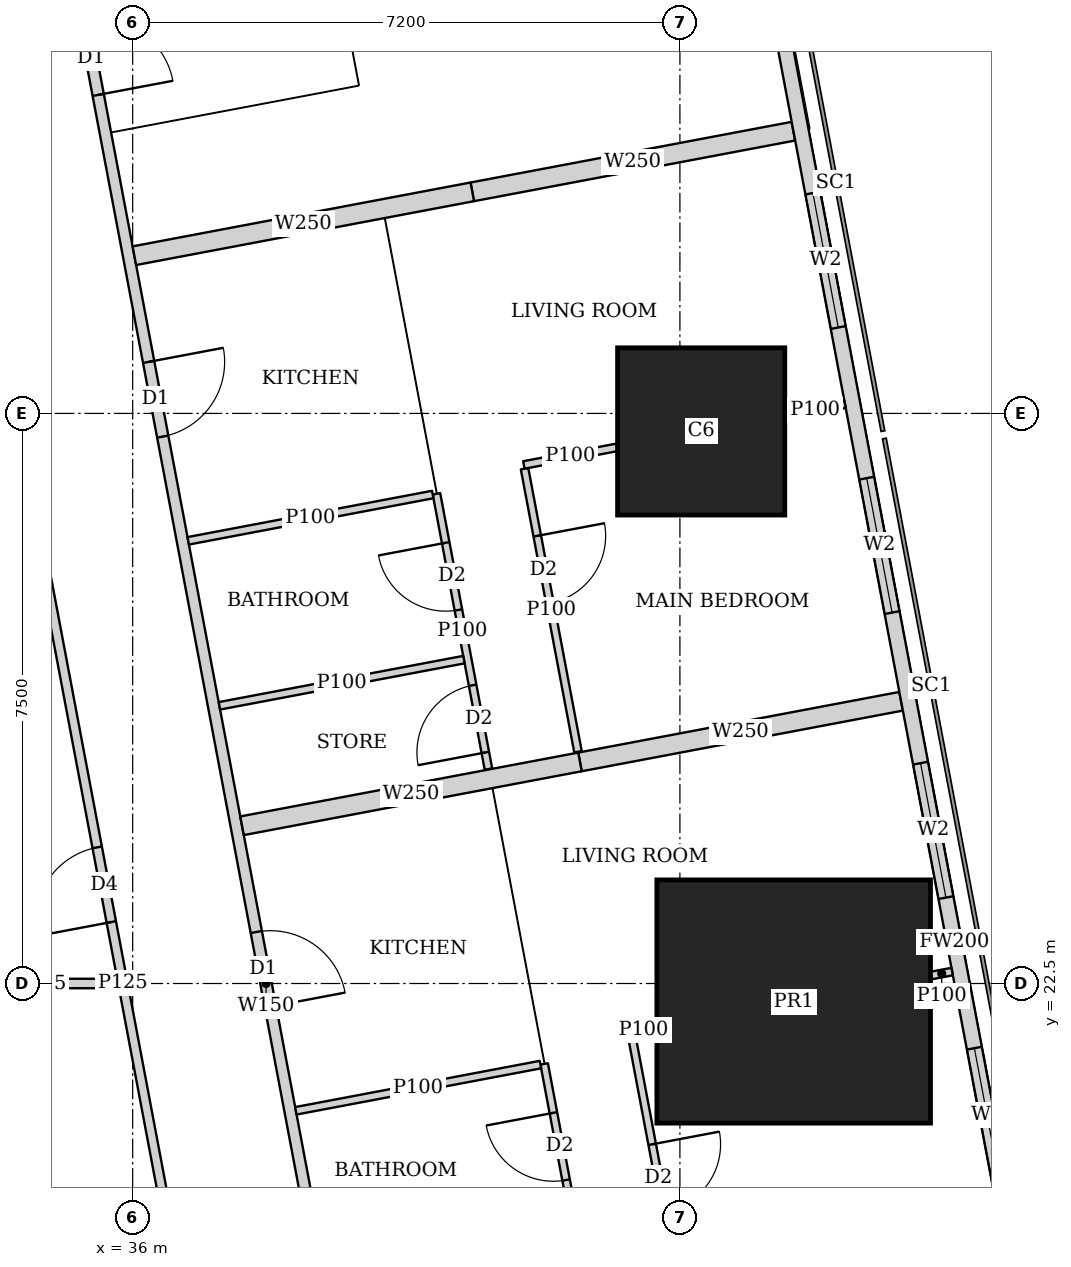
"""IFC4 building model, lengths in metres.
Left out: names, types, materials, properties, quantities, classifications, styles, units other than length and angle.
Written with IfcOpenShell. Run it as: python <this file> out.ifc"""

import sys

from ifc_helpers import new_model, si_unit, direction, frame, frame_2d, origin, origin_2d, place, context, subcontext, project, spatial, rectangle, extrude, element, fill, save


model = new_model("IFC4")
c1 = context("Model", 3, precision=1e-05, world=origin(), true_north=direction((0.0, 1.0)))
c2 = subcontext(c1, "Body", "Model", "MODEL_VIEW")
j1 = project(units=[si_unit("LENGTHUNIT", "METRE"), si_unit("PLANEANGLEUNIT", "RADIAN")], contexts=[c1])
p1 = place(None, origin())
s1 = spatial("IfcSite", under=j1, at=p1, CompositionType="ELEMENT")
p2 = place(p1, origin())
s2 = spatial("IfcBuilding", under=s1, at=p2, CompositionType="ELEMENT")
p3 = place(p2, frame((0.0, 0.0, 122.9)))
s3 = spatial("IfcBuildingStorey", under=s2, at=p3, CompositionType="ELEMENT", Elevation=122.9)
p4 = place(p3, frame((44.697, 22.263, 0.0), z_axis=(0.0, 0.0, 1.0), x_axis=(1.0, 0.0, 0.0)))
e1 = element("IfcColumn", 1, at=p4, inside=s3, PredefinedType="COLUMN", context=c2, shape_type="SweptSolid", body=[
    extrude(rectangle(XDim=3.6, YDim=3.2, at=origin_2d()), origin(), (0.0, 0.0, 1.0), 3.75),
])
p5 = place(p3, frame((43.48, 29.763, 0.0), z_axis=(0.0, 0.0, 1.0), x_axis=(1.0, 0.0, 0.0)))
e2 = element("IfcColumn", 2, at=p5, inside=s3, PredefinedType="COLUMN", context=c2, shape_type="SweptSolid", body=[
    extrude(rectangle(XDim=2.2, YDim=2.2, at=origin_2d()), origin(), (0.0, 0.0, 1.0), 3.75),
])
p6 = place(p3, frame((50.653, 2.703, 0.0), z_axis=(0.0, 0.0, 1.0), x_axis=(-0.185612026696, 0.982623109613, 0.0)))
e3 = element("IfcWall", 3, at=p6, inside=s3, PredefinedType="SOLIDWALL", context=c2, shape_type="SweptSolid", body=[
    extrude(rectangle(XDim=41.393, YDim=0.2, at=frame_2d((20.697, 0.0))), origin(), (0.0, 0.0, 1.0), 3.5),
])
p7 = place(p6, frame((1.633, 0.0, 0.9)))
e4 = element("IfcOpeningElement", 4, at=p7, cuts=e3, PredefinedType="OPENING", context=c2, shape_type="SweptSolid", body=[
    extrude(rectangle(XDim=1.8, YDim=1.5, at=frame_2d((0.9, 0.75))), frame((0.0, 0.11, 0.0), z_axis=(0.0, -1.0, 0.0), x_axis=(1.0, 0.0, 0.0)), (0.0, 0.0, 1.0), 0.22),
])
p8 = place(p6, frame((6.032, 0.0, 0.9)))
e5 = element("IfcOpeningElement", 5, at=p8, cuts=e3, PredefinedType="OPENING", context=c2, shape_type="SweptSolid", body=[
    extrude(rectangle(XDim=1.8, YDim=1.5, at=frame_2d((0.9, 0.75))), frame((0.0, 0.11, 0.0), z_axis=(0.0, -1.0, 0.0), x_axis=(1.0, 0.0, 0.0)), (0.0, 0.0, 1.0), 0.22),
])
p9 = place(p6, frame((9.848, 0.0, 0.9)))
e6 = element("IfcOpeningElement", 6, at=p9, cuts=e3, PredefinedType="OPENING", context=c2, shape_type="SweptSolid", body=[
    extrude(rectangle(XDim=1.8, YDim=1.5, at=frame_2d((0.9, 0.75))), frame((0.0, 0.11, 0.0), z_axis=(0.0, -1.0, 0.0), x_axis=(1.0, 0.0, 0.0)), (0.0, 0.0, 1.0), 0.22),
])
p10 = place(p6, frame((13.664, 0.0, 0.9)))
e7 = element("IfcOpeningElement", 7, at=p10, cuts=e3, PredefinedType="OPENING", context=c2, shape_type="SweptSolid", body=[
    extrude(rectangle(XDim=1.8, YDim=1.5, at=frame_2d((0.9, 0.75))), frame((0.0, 0.11, 0.0), z_axis=(0.0, -1.0, 0.0), x_axis=(1.0, 0.0, 0.0)), (0.0, 0.0, 1.0), 0.22),
])
p11 = place(p6, frame((17.481, 0.0, 0.9)))
e8 = element("IfcOpeningElement", 8, at=p11, cuts=e3, PredefinedType="OPENING", context=c2, shape_type="SweptSolid", body=[
    extrude(rectangle(XDim=1.8, YDim=1.5, at=frame_2d((0.9, 0.75))), frame((0.0, 0.11, 0.0), z_axis=(0.0, -1.0, 0.0), x_axis=(1.0, 0.0, 0.0)), (0.0, 0.0, 1.0), 0.22),
])
p12 = place(p6, frame((21.297, 0.0, 0.9)))
e9 = element("IfcOpeningElement", 9, at=p12, cuts=e3, PredefinedType="OPENING", context=c2, shape_type="SweptSolid", body=[
    extrude(rectangle(XDim=1.8, YDim=1.5, at=frame_2d((0.9, 0.75))), frame((0.0, 0.11, 0.0), z_axis=(0.0, -1.0, 0.0), x_axis=(1.0, 0.0, 0.0)), (0.0, 0.0, 1.0), 0.22),
])
p13 = place(p6, frame((25.113, 0.0, 0.9)))
e10 = element("IfcOpeningElement", 10, at=p13, cuts=e3, PredefinedType="OPENING", context=c2, shape_type="SweptSolid", body=[
    extrude(rectangle(XDim=1.8, YDim=1.5, at=frame_2d((0.9, 0.75))), frame((0.0, 0.11, 0.0), z_axis=(0.0, -1.0, 0.0), x_axis=(1.0, 0.0, 0.0)), (0.0, 0.0, 1.0), 0.22),
])
p14 = place(p6, frame((28.93, 0.0, 0.9)))
e11 = element("IfcOpeningElement", 11, at=p14, cuts=e3, PredefinedType="OPENING", context=c2, shape_type="SweptSolid", body=[
    extrude(rectangle(XDim=1.8, YDim=1.5, at=frame_2d((0.9, 0.75))), frame((0.0, 0.11, 0.0), z_axis=(0.0, -1.0, 0.0), x_axis=(1.0, 0.0, 0.0)), (0.0, 0.0, 1.0), 0.22),
])
p15 = place(p6, frame((32.746, 0.0, 0.9)))
e12 = element("IfcOpeningElement", 12, at=p15, cuts=e3, PredefinedType="OPENING", context=c2, shape_type="SweptSolid", body=[
    extrude(rectangle(XDim=1.8, YDim=1.5, at=frame_2d((0.9, 0.75))), frame((0.0, 0.11, 0.0), z_axis=(0.0, -1.0, 0.0), x_axis=(1.0, 0.0, 0.0)), (0.0, 0.0, 1.0), 0.22),
])
p16 = place(p6, frame((36.481, 0.0, 0.9)))
e13 = element("IfcOpeningElement", 13, at=p16, cuts=e3, PredefinedType="OPENING", context=c2, shape_type="SweptSolid", body=[
    extrude(rectangle(XDim=1.8, YDim=1.5, at=frame_2d((0.9, 0.75))), frame((0.0, 0.11, 0.0), z_axis=(0.0, -1.0, 0.0), x_axis=(1.0, 0.0, 0.0)), (0.0, 0.0, 1.0), 0.22),
])
p17 = place(p3, frame((33.382, 45.65, 0.0), z_axis=(0.0, 0.0, 1.0), x_axis=(0.185593544777, -0.982626600565, 0.0)))
e14 = element("IfcWall", 14, at=p17, inside=s3, PredefinedType="SOLIDWALL", context=c2, shape_type="SweptSolid", body=[
    extrude(rectangle(XDim=47.118, YDim=0.15, at=frame_2d((23.559, 0.0))), origin(), (0.0, 0.0, 1.0), 2.2),
])
p18 = place(p17, frame((10.662, 0.0, 0.0)))
e15 = element("IfcOpeningElement", 15, at=p18, cuts=e14, PredefinedType="OPENING", context=c2, shape_type="SweptSolid", body=[
    extrude(rectangle(XDim=1.0, YDim=2.1, at=frame_2d((0.5, 1.05))), frame((0.0, 0.085, 0.0), z_axis=(0.0, -1.0, 0.0), x_axis=(1.0, 0.0, 0.0)), (0.0, 0.0, 1.0), 0.17),
])
p19 = place(p17, frame((15.237, 0.0, 0.0)))
e16 = element("IfcOpeningElement", 16, at=p19, cuts=e14, PredefinedType="OPENING", context=c2, shape_type="SweptSolid", body=[
    extrude(rectangle(XDim=1.0, YDim=2.1, at=frame_2d((0.5, 1.05))), frame((0.0, 0.085, 0.0), z_axis=(0.0, -1.0, 0.0), x_axis=(1.0, 0.0, 0.0)), (0.0, 0.0, 1.0), 0.17),
])
p20 = place(p17, frame((22.87, 0.0, 0.0)))
e17 = element("IfcOpeningElement", 17, at=p20, cuts=e14, PredefinedType="OPENING", context=c2, shape_type="SweptSolid", body=[
    extrude(rectangle(XDim=1.0, YDim=2.1, at=frame_2d((0.5, 1.05))), frame((0.0, 0.085, 0.0), z_axis=(0.0, -1.0, 0.0), x_axis=(1.0, 0.0, 0.0)), (0.0, 0.0, 1.0), 0.17),
])
p21 = place(p17, frame((33.833, 0.0, 0.0)))
e18 = element("IfcOpeningElement", 18, at=p21, cuts=e14, PredefinedType="OPENING", context=c2, shape_type="SweptSolid", body=[
    extrude(rectangle(XDim=1.0, YDim=2.1, at=frame_2d((0.5, 1.05))), frame((0.0, 0.085, 0.0), z_axis=(0.0, -1.0, 0.0), x_axis=(1.0, 0.0, 0.0)), (0.0, 0.0, 1.0), 0.17),
])
p22 = place(p3, frame((41.156, 29.273, 0.0), z_axis=(0.0, 0.0, 1.0), x_axis=(0.185474762472, -0.982649028131, 0.0)))
e19 = element("IfcWall", 19, at=p22, inside=s3, PredefinedType="PARTITIONING", context=c2, shape_type="SweptSolid", body=[
    extrude(rectangle(XDim=3.79, YDim=0.1, at=frame_2d((1.895, 0.0))), origin(), (0.0, 0.0, 1.0), 2.5),
])
p23 = place(p22, frame((0.9, 0.0, 0.0)))
e20 = element("IfcOpeningElement", 20, at=p23, cuts=e19, PredefinedType="OPENING", context=c2, shape_type="SweptSolid", body=[
    extrude(rectangle(XDim=0.9, YDim=2.1, at=frame_2d((0.45, 1.05))), frame((0.0, 0.06, 0.0), z_axis=(0.0, -1.0, 0.0), x_axis=(1.0, 0.0, 0.0)), (0.0, 0.0, 1.0), 0.12),
])
p24 = place(p3, frame((39.997, 28.942, 0.0), z_axis=(0.0, 0.0, 1.0), x_axis=(0.185580474845, -0.982629069057, 0.0)))
e21 = element("IfcWall", 21, at=p24, inside=s3, PredefinedType="PARTITIONING", context=c2, shape_type="SweptSolid", body=[
    extrude(rectangle(XDim=3.685, YDim=0.1, at=frame_2d((1.842, 0.0))), origin(), (0.0, 0.0, 1.0), 3.5),
])
p25 = place(p24, frame((0.655, 0.0, 0.0)))
e22 = element("IfcOpeningElement", 22, at=p25, cuts=e21, PredefinedType="OPENING", context=c2, shape_type="SweptSolid", body=[
    extrude(rectangle(XDim=0.9, YDim=2.1, at=frame_2d((0.45, 1.05))), frame((0.0, 0.06, 0.0), z_axis=(0.0, -1.0, 0.0), x_axis=(1.0, 0.0, 0.0)), (0.0, 0.0, 1.0), 0.12),
])
p26 = place(p24, frame((2.563, 0.0, 0.0)))
e23 = element("IfcOpeningElement", 23, at=p26, cuts=e21, PredefinedType="OPENING", context=c2, shape_type="SweptSolid", body=[
    extrude(rectangle(XDim=0.9, YDim=2.1, at=frame_2d((0.45, 1.05))), frame((0.0, 0.06, 0.0), z_axis=(0.0, -1.0, 0.0), x_axis=(1.0, 0.0, 0.0)), (0.0, 0.0, 1.0), 0.12),
])
p27 = place(p3, frame((45.372, 30.121, 0.0), z_axis=(0.0, 0.0, 1.0), x_axis=(-0.982512656401, -0.186195810938, 0.0)))
e24 = element("IfcWall", 24, at=p27, inside=s3, PredefinedType="PARTITIONING", context=c2, shape_type="SweptSolid", body=[
    extrude(rectangle(XDim=0.796, YDim=0.1, at=frame_2d((0.398, 0.0))), origin(), (0.0, 0.0, 1.0), 3.5),
])
p28 = place(p3, frame((42.37, 29.553, 0.0), z_axis=(0.0, 0.0, 1.0), x_axis=(-0.98263602344, -0.185543648338, 0.0)))
e25 = element("IfcWall", 25, at=p28, inside=s3, PredefinedType="PARTITIONING", context=c2, shape_type="SweptSolid", body=[
    extrude(rectangle(XDim=1.245, YDim=0.1, at=frame_2d((0.623, 0.0))), origin(), (0.0, 0.0, 1.0), 2.5),
])
p29 = place(p3, frame((39.948, 28.933, 0.0), z_axis=(0.0, 0.0, 1.0), x_axis=(-0.982542259571, -0.186039533857, 0.0)))
e26 = element("IfcWall", 26, at=p29, inside=s3, PredefinedType="PARTITIONING", context=c2, shape_type="SweptSolid", body=[
    extrude(rectangle(XDim=3.274, YDim=0.1, at=frame_2d((1.637, 0.0))), origin(), (0.0, 0.0, 1.0), 3.5),
])
p30 = place(p3, frame((40.358, 26.761, 0.0), z_axis=(0.0, 0.0, 1.0), x_axis=(-0.982607776398, -0.185693181787, 0.0)))
e27 = element("IfcWall", 27, at=p30, inside=s3, PredefinedType="PARTITIONING", context=c2, shape_type="SweptSolid", body=[
    extrude(rectangle(XDim=3.274, YDim=0.1, at=frame_2d((1.637, 0.0))), origin(), (0.0, 0.0, 1.0), 3.5),
])
p31 = place(p3, frame((44.693, 33.713, 0.0), z_axis=(0.0, 0.0, 1.0), x_axis=(-0.982633535512, -0.185556823879, 0.0)))
e28 = element("IfcWall", 28, at=p31, inside=s3, PredefinedType="SOLIDWALL", context=c2, shape_type="SweptSolid", body=[
    extrude(rectangle(XDim=4.3, YDim=0.25, at=frame_2d((2.15, 0.0))), origin(), (0.0, 0.0, 1.0), 2.2),
])
p32 = place(p3, frame((40.468, 32.915, 0.0), z_axis=(0.0, 0.0, 1.0), x_axis=(-0.982612837616, -0.185666398014, 0.0)))
e29 = element("IfcWall", 29, at=p32, inside=s3, PredefinedType="SOLIDWALL", context=c2, shape_type="SweptSolid", body=[
    extrude(rectangle(XDim=4.525, YDim=0.25, at=frame_2d((2.262, 0.0))), origin(), (0.0, 0.0, 1.0), 3.5),
])
p33 = place(p3, frame((42.566, 21.809, 0.0), z_axis=(0.0, 0.0, 1.0), x_axis=(0.18559218796, -0.982626856832, 0.0)))
e30 = element("IfcWall", 30, at=p33, inside=s3, PredefinedType="PARTITIONING", context=c2, shape_type="SweptSolid", body=[
    extrude(rectangle(XDim=6.105, YDim=0.1, at=frame_2d((3.052, 0.0))), origin(), (0.0, 0.0, 1.0), 2.5),
])
p34 = place(p33, frame((1.45, 0.0, 0.0)))
e31 = element("IfcOpeningElement", 31, at=p34, cuts=e30, PredefinedType="OPENING", context=c2, shape_type="SweptSolid", body=[
    extrude(rectangle(XDim=0.9, YDim=2.1, at=frame_2d((0.45, 1.05))), frame((0.0, 0.06, 0.0), z_axis=(0.0, -1.0, 0.0), x_axis=(1.0, 0.0, 0.0)), (0.0, 0.0, 1.0), 0.12),
])
p35 = place(p33, frame((4.163, 0.0, 0.0)))
e32 = element("IfcOpeningElement", 32, at=p35, cuts=e30, PredefinedType="OPENING", context=c2, shape_type="SweptSolid", body=[
    extrude(rectangle(XDim=0.9, YDim=2.1, at=frame_2d((0.45, 1.05))), frame((0.0, 0.06, 0.0), z_axis=(0.0, -1.0, 0.0), x_axis=(1.0, 0.0, 0.0)), (0.0, 0.0, 1.0), 0.12),
])
p36 = place(p3, frame((41.414, 21.442, 0.0), z_axis=(0.0, 0.0, 1.0), x_axis=(0.185636022079, -0.982618576716, 0.0)))
e33 = element("IfcWall", 33, at=p36, inside=s3, PredefinedType="PARTITIONING", context=c2, shape_type="SweptSolid", body=[
    extrude(rectangle(XDim=5.731, YDim=0.1, at=frame_2d((2.866, 0.0))), origin(), (0.0, 0.0, 1.0), 3.5),
])
p37 = place(p36, frame((0.655, 0.0, 0.0)))
e34 = element("IfcOpeningElement", 34, at=p37, cuts=e33, PredefinedType="OPENING", context=c2, shape_type="SweptSolid", body=[
    extrude(rectangle(XDim=0.9, YDim=2.1, at=frame_2d((0.45, 1.05))), frame((0.0, 0.06, 0.0), z_axis=(0.0, -1.0, 0.0), x_axis=(1.0, 0.0, 0.0)), (0.0, 0.0, 1.0), 0.12),
])
p38 = place(p36, frame((2.563, 0.0, 0.0)))
e35 = element("IfcOpeningElement", 35, at=p38, cuts=e33, PredefinedType="OPENING", context=c2, shape_type="SweptSolid", body=[
    extrude(rectangle(XDim=0.9, YDim=2.1, at=frame_2d((0.45, 1.05))), frame((0.0, 0.06, 0.0), z_axis=(0.0, -1.0, 0.0), x_axis=(1.0, 0.0, 0.0)), (0.0, 0.0, 1.0), 0.12),
])
p39 = place(p3, frame((46.782, 22.657, 0.0), z_axis=(0.0, 0.0, 1.0), x_axis=(-0.982574553168, -0.185868898601, 0.0)))
e36 = element("IfcWall", 36, at=p39, inside=s3, PredefinedType="PARTITIONING", context=c2, shape_type="SweptSolid", body=[
    extrude(rectangle(XDim=0.28, YDim=0.1, at=frame_2d((0.14, 0.0))), origin(), (0.0, 0.0, 1.0), 3.5),
])
p40 = place(p3, frame((42.887, 21.921, 0.0), z_axis=(0.0, 0.0, 1.0), x_axis=(-0.982274918032, -0.187445953293, 0.0)))
e37 = element("IfcWall", 37, at=p40, inside=s3, PredefinedType="PARTITIONING", context=c2, shape_type="SweptSolid", body=[
    extrude(rectangle(XDim=0.336, YDim=0.1, at=frame_2d((0.168, 0.0))), origin(), (0.0, 0.0, 1.0), 2.5),
])
p41 = place(p3, frame((41.365, 21.433, 0.0), z_axis=(0.0, 0.0, 1.0), x_axis=(-0.982607026909, -0.185697147715, 0.0)))
e38 = element("IfcWall", 38, at=p41, inside=s3, PredefinedType="PARTITIONING", context=c2, shape_type="SweptSolid", body=[
    extrude(rectangle(XDim=3.275, YDim=0.1, at=frame_2d((1.637, 0.0))), origin(), (0.0, 0.0, 1.0), 3.5),
])
p42 = place(p3, frame((46.11, 26.213, 0.0), z_axis=(0.0, 0.0, 1.0), x_axis=(-0.982633535512, -0.185556823879, 0.0)))
e39 = element("IfcWall", 39, at=p42, inside=s3, PredefinedType="SOLIDWALL", context=c2, shape_type="SweptSolid", body=[
    extrude(rectangle(XDim=4.3, YDim=0.25, at=frame_2d((2.15, 0.0))), origin(), (0.0, 0.0, 1.0), 2.2),
])
p43 = place(p3, frame((41.885, 25.415, 0.0), z_axis=(0.0, 0.0, 1.0), x_axis=(-0.982612837616, -0.185666398014, 0.0)))
e40 = element("IfcWall", 40, at=p43, inside=s3, PredefinedType="SOLIDWALL", context=c2, shape_type="SweptSolid", body=[
    extrude(rectangle(XDim=4.525, YDim=0.25, at=frame_2d((2.262, 0.0))), origin(), (0.0, 0.0, 1.0), 3.5),
])
p44 = place(p3, frame((38.202, 10.163, 0.0), z_axis=(0.0, 0.0, 1.0), x_axis=(-0.185610321132, 0.982623431783, 0.0)))
e41 = element("IfcWall", 41, at=p44, inside=s3, PredefinedType="PARTITIONING", context=c2, shape_type="SweptSolid", body=[
    extrude(rectangle(XDim=25.111, YDim=0.125, at=frame_2d((12.556, 0.0))), origin(), (0.0, 0.0, 1.0), 2.5),
])
p45 = place(p44, frame((0.708, 0.0, 0.0)))
e42 = element("IfcOpeningElement", 42, at=p45, cuts=e41, PredefinedType="OPENING", context=c2, shape_type="SweptSolid", body=[
    extrude(rectangle(XDim=1.0, YDim=2.1, at=frame_2d((0.5, 1.05))), frame((0.0, 0.073, 0.0), z_axis=(0.0, -1.0, 0.0), x_axis=(1.0, 0.0, 0.0)), (0.0, 0.0, 1.0), 0.145),
])
p46 = place(p44, frame((13.378, 0.0, 0.0)))
e43 = element("IfcOpeningElement", 43, at=p46, cuts=e41, PredefinedType="OPENING", context=c2, shape_type="SweptSolid", body=[
    extrude(rectangle(XDim=1.0, YDim=2.1, at=frame_2d((0.5, 1.05))), frame((0.0, 0.073, 0.0), z_axis=(0.0, -1.0, 0.0), x_axis=(1.0, 0.0, 0.0)), (0.0, 0.0, 1.0), 0.145),
])
p47 = place(p44, frame((21.25, 0.0, 0.0)))
e44 = element("IfcOpeningElement", 44, at=p47, cuts=e41, PredefinedType="OPENING", context=c2, shape_type="SweptSolid", body=[
    extrude(rectangle(XDim=1.0, YDim=2.1, at=frame_2d((0.5, 1.05))), frame((0.0, 0.073, 0.0), z_axis=(0.0, -1.0, 0.0), x_axis=(1.0, 0.0, 0.0)), (0.0, 0.0, 1.0), 0.145),
])
p48 = place(p44, frame((23.453, 0.0, 0.0)))
e45 = element("IfcOpeningElement", 45, at=p48, cuts=e41, PredefinedType="OPENING", context=c2, shape_type="SweptSolid", body=[
    extrude(rectangle(XDim=1.0, YDim=2.1, at=frame_2d((0.5, 1.05))), frame((0.0, 0.073, 0.0), z_axis=(0.0, -1.0, 0.0), x_axis=(1.0, 0.0, 0.0)), (0.0, 0.0, 1.0), 0.145),
])
p49 = place(p3, frame((33.801, 22.5, 0.0), z_axis=(0.0, 0.0, 1.0), x_axis=(1.0, 0.0, 0.0)))
e46 = element("IfcWall", 46, at=p49, inside=s3, PredefinedType="PARTITIONING", context=c2, shape_type="SweptSolid", body=[
    extrude(rectangle(XDim=1.995, YDim=0.125, at=frame_2d((0.998, 0.0))), origin(), (0.0, 0.0, 1.0), 2.5),
])
p50 = place(p11, origin())
e47 = element("IfcWindow", 47, at=p50, inside=s3, PartitioningType="SINGLE_PANEL", PredefinedType="WINDOW", context=c2, shape_type="SweptSolid", body=[
    extrude(rectangle(XDim=1.8, YDim=1.5, at=frame_2d((0.9, 0.75))), frame((0.0, 0.03, 0.0), z_axis=(0.0, -1.0, 0.0), x_axis=(1.0, 0.0, 0.0)), (0.0, 0.0, 1.0), 0.06),
])
fill(e8, e47)
p51 = place(p12, origin())
e48 = element("IfcWindow", 48, at=p51, inside=s3, PartitioningType="SINGLE_PANEL", PredefinedType="WINDOW", context=c2, shape_type="SweptSolid", body=[
    extrude(rectangle(XDim=1.8, YDim=1.5, at=frame_2d((0.9, 0.75))), frame((0.0, 0.03, 0.0), z_axis=(0.0, -1.0, 0.0), x_axis=(1.0, 0.0, 0.0)), (0.0, 0.0, 1.0), 0.06),
])
fill(e9, e48)
p52 = place(p13, origin())
e49 = element("IfcWindow", 49, at=p52, inside=s3, PartitioningType="SINGLE_PANEL", PredefinedType="WINDOW", context=c2, shape_type="SweptSolid", body=[
    extrude(rectangle(XDim=1.8, YDim=1.5, at=frame_2d((0.9, 0.75))), frame((0.0, 0.03, 0.0), z_axis=(0.0, -1.0, 0.0), x_axis=(1.0, 0.0, 0.0)), (0.0, 0.0, 1.0), 0.06),
])
fill(e10, e49)
p53 = place(p14, origin())
e50 = element("IfcWindow", 50, at=p53, inside=s3, PartitioningType="SINGLE_PANEL", PredefinedType="WINDOW", context=c2, shape_type="SweptSolid", body=[
    extrude(rectangle(XDim=1.8, YDim=1.5, at=frame_2d((0.9, 0.75))), frame((0.0, 0.03, 0.0), z_axis=(0.0, -1.0, 0.0), x_axis=(1.0, 0.0, 0.0)), (0.0, 0.0, 1.0), 0.06),
])
fill(e11, e50)
p54 = place(p18, origin())
e51 = element("IfcDoor", 51, at=p54, inside=s3, OperationType="SINGLE_SWING_RIGHT", PredefinedType="DOOR", context=c2, shape_type="SweptSolid", body=[
    extrude(rectangle(XDim=1.0, YDim=2.1, at=frame_2d((0.5, 1.05))), frame((0.0, 0.025, 0.0), z_axis=(0.0, -1.0, 0.0), x_axis=(1.0, 0.0, 0.0)), (0.0, 0.0, 1.0), 0.05),
])
fill(e15, e51)
p55 = place(p23, origin())
e52 = element("IfcDoor", 52, at=p55, inside=s3, OperationType="SINGLE_SWING_LEFT", PredefinedType="DOOR", context=c2, shape_type="SweptSolid", body=[
    extrude(rectangle(XDim=0.9, YDim=2.1, at=frame_2d((0.45, 1.05))), frame((0.0, 0.025, 0.0), z_axis=(0.0, -1.0, 0.0), x_axis=(1.0, 0.0, 0.0)), (0.0, 0.0, 1.0), 0.05),
])
fill(e20, e52)
p56 = place(p25, origin())
e53 = element("IfcDoor", 53, at=p56, inside=s3, OperationType="SINGLE_SWING_RIGHT", PredefinedType="DOOR", context=c2, shape_type="SweptSolid", body=[
    extrude(rectangle(XDim=0.9, YDim=2.1, at=frame_2d((0.45, 1.05))), frame((0.0, 0.025, 0.0), z_axis=(0.0, -1.0, 0.0), x_axis=(1.0, 0.0, 0.0)), (0.0, 0.0, 1.0), 0.05),
])
fill(e22, e53)
p57 = place(p26, origin())
e54 = element("IfcDoor", 54, at=p57, inside=s3, OperationType="SINGLE_SWING_LEFT", PredefinedType="DOOR", context=c2, shape_type="SweptSolid", body=[
    extrude(rectangle(XDim=0.9, YDim=2.1, at=frame_2d((0.45, 1.05))), frame((0.0, 0.025, 0.0), z_axis=(0.0, -1.0, 0.0), x_axis=(1.0, 0.0, 0.0)), (0.0, 0.0, 1.0), 0.05),
])
fill(e23, e54)
p58 = place(p19, origin())
e55 = element("IfcDoor", 55, at=p58, inside=s3, OperationType="SINGLE_SWING_LEFT", PredefinedType="DOOR", context=c2, shape_type="SweptSolid", body=[
    extrude(rectangle(XDim=1.0, YDim=2.1, at=frame_2d((0.5, 1.05))), frame((0.0, 0.025, 0.0), z_axis=(0.0, -1.0, 0.0), x_axis=(1.0, 0.0, 0.0)), (0.0, 0.0, 1.0), 0.05),
])
fill(e16, e55)
p59 = place(p34, origin())
e56 = element("IfcDoor", 56, at=p59, inside=s3, OperationType="SINGLE_SWING_LEFT", PredefinedType="DOOR", context=c2, shape_type="SweptSolid", body=[
    extrude(rectangle(XDim=0.9, YDim=2.1, at=frame_2d((0.45, 1.05))), frame((0.0, 0.025, 0.0), z_axis=(0.0, -1.0, 0.0), x_axis=(1.0, 0.0, 0.0)), (0.0, 0.0, 1.0), 0.05),
])
fill(e31, e56)
p60 = place(p37, origin())
e57 = element("IfcDoor", 57, at=p60, inside=s3, OperationType="SINGLE_SWING_RIGHT", PredefinedType="DOOR", context=c2, shape_type="SweptSolid", body=[
    extrude(rectangle(XDim=0.9, YDim=2.1, at=frame_2d((0.45, 1.05))), frame((0.0, 0.025, 0.0), z_axis=(0.0, -1.0, 0.0), x_axis=(1.0, 0.0, 0.0)), (0.0, 0.0, 1.0), 0.05),
])
fill(e34, e57)
p61 = place(p20, origin())
e58 = element("IfcDoor", 58, at=p61, inside=s3, OperationType="SINGLE_SWING_RIGHT", PredefinedType="DOOR", context=c2, shape_type="SweptSolid", body=[
    extrude(rectangle(XDim=1.0, YDim=2.1, at=frame_2d((0.5, 1.05))), frame((0.0, 0.025, 0.0), z_axis=(0.0, -1.0, 0.0), x_axis=(1.0, 0.0, 0.0)), (0.0, 0.0, 1.0), 0.05),
])
fill(e17, e58)
p62 = place(p46, origin())
e59 = element("IfcDoor", 59, at=p62, inside=s3, OperationType="SINGLE_SWING_LEFT", PredefinedType="DOOR", context=c2, shape_type="SweptSolid", body=[
    extrude(rectangle(XDim=1.0, YDim=2.1, at=frame_2d((0.5, 1.05))), frame((0.0, 0.025, 0.0), z_axis=(0.0, -1.0, 0.0), x_axis=(1.0, 0.0, 0.0)), (0.0, 0.0, 1.0), 0.05),
])
fill(e43, e59)
save(model, sys.argv[1])
